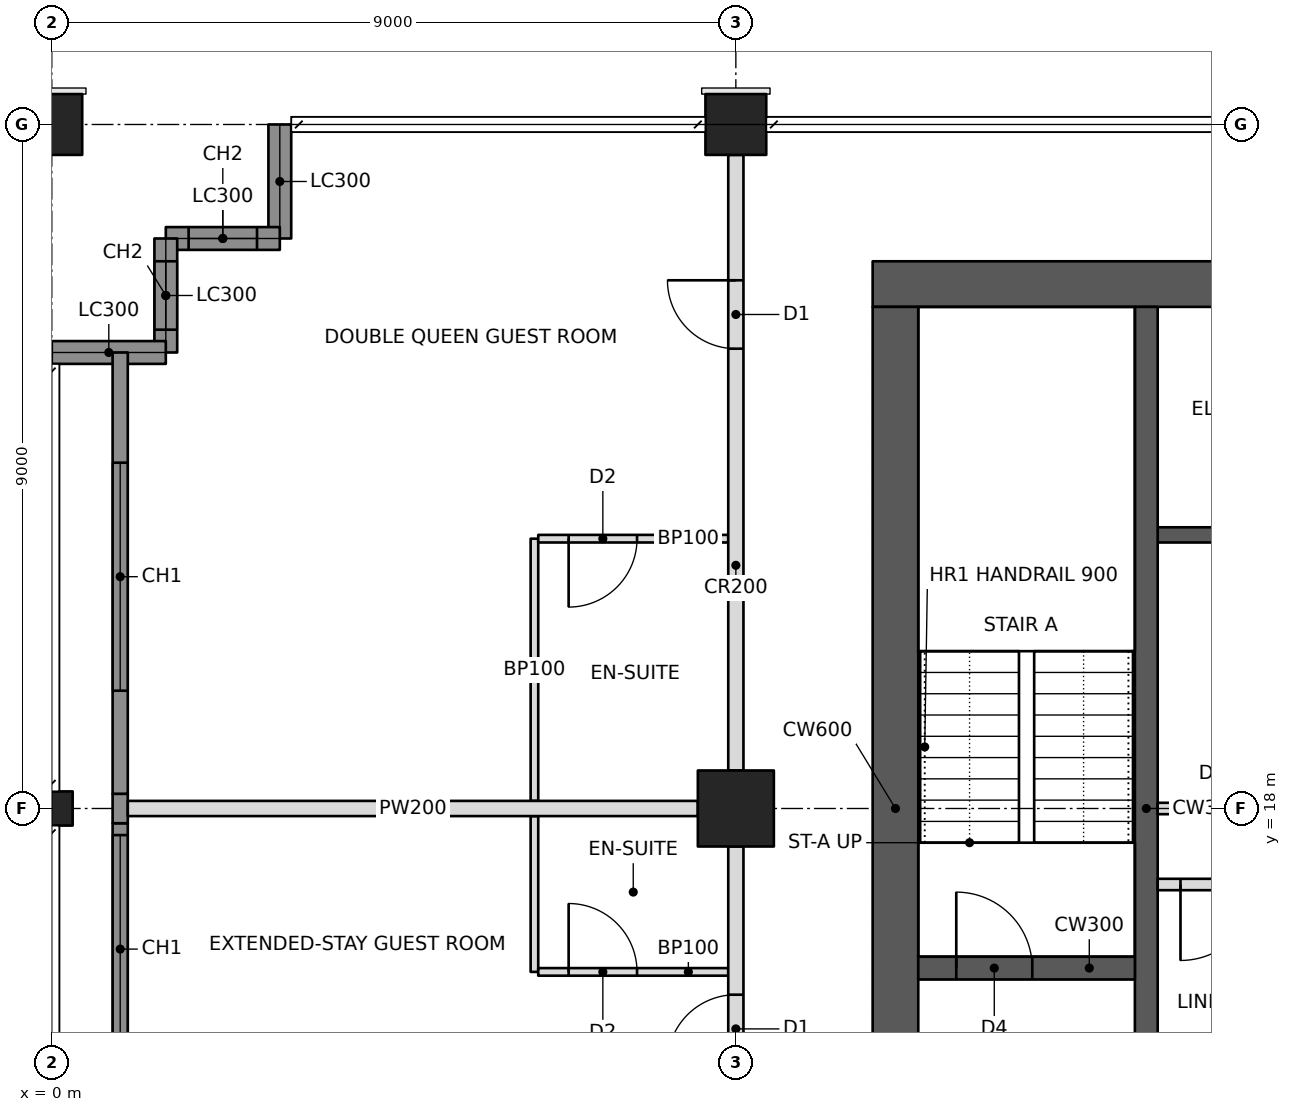
"""IFC4 building model, lengths in metres.
Left out: names, types, materials, properties, quantities, classifications, styles, units other than length and angle.
Written with IfcOpenShell. Run it as: python <this file> out.ifc"""

import sys

from ifc_helpers import new_model, si_unit, direction, frame, frame_2d, origin, origin_2d, place, context, subcontext, project, spatial, rectangle, hollow_rectangle, i_section, extrude, element, fill, save


model = new_model("IFC4")
c1 = context("Model", 3, precision=1e-05, world=origin(), true_north=direction((0.0, 1.0)))
c2 = subcontext(c1, "Body", "Model", "MODEL_VIEW")
j1 = project(units=[si_unit("LENGTHUNIT", "METRE"), si_unit("PLANEANGLEUNIT", "RADIAN")], contexts=[c1])
p1 = place(None, origin())
s1 = spatial("IfcSite", under=j1, at=p1, CompositionType="ELEMENT")
p2 = place(p1, origin())
s2 = spatial("IfcBuilding", under=s1, at=p2, CompositionType="ELEMENT")
p3 = place(p2, frame((0.0, 0.0, 163.8)))
s3 = spatial("IfcBuildingStorey", under=s2, at=p3, CompositionType="ELEMENT", Elevation=163.8)
p4 = place(p3, frame((0.0, 18.0, 0.0), z_axis=(0.0, 0.0, 1.0), x_axis=(0.0, 1.0, 0.0)))
e1 = element("IfcColumn", 1, at=p4, inside=s3, PredefinedType="COLUMN", context=c2, shape_type="SweptSolid", body=[
    extrude(i_section(OverallWidth=0.449, OverallDepth=0.549, WebThickness=0.072, FlangeThickness=0.115, at=origin_2d()), origin(), (0.0, 0.0, 1.0), 3.4),
])
p5 = place(p3, frame((0.0, 27.0, 0.0), z_axis=(0.0, 0.0, 1.0), x_axis=(0.0, 1.0, 0.0)))
e2 = element("IfcColumn", 2, at=p5, inside=s3, PredefinedType="COLUMN", context=c2, shape_type="SweptSolid", body=[
    extrude(hollow_rectangle(XDim=0.8, YDim=0.8, WallThickness=0.07, at=origin_2d()), origin(), (0.0, 0.0, 1.0), 3.4),
])
p6 = place(p3, frame((9.0, 18.0, 0.0), z_axis=(0.0, 0.0, 1.0), x_axis=(1.0, 0.0, 0.0)))
e3 = element("IfcColumn", 3, at=p6, inside=s3, PredefinedType="COLUMN", context=c2, shape_type="SweptSolid", body=[
    extrude(hollow_rectangle(XDim=1.0, YDim=1.0, WallThickness=0.1, at=origin_2d()), origin(), (0.0, 0.0, 1.0), 3.4),
])
p7 = place(p3, frame((9.0, 27.0, 0.0), z_axis=(0.0, 0.0, 1.0), x_axis=(1.0, 0.0, 0.0)))
e4 = element("IfcColumn", 4, at=p7, inside=s3, PredefinedType="COLUMN", context=c2, shape_type="SweptSolid", body=[
    extrude(hollow_rectangle(XDim=0.8, YDim=0.8, WallThickness=0.07, at=origin_2d()), origin(), (0.0, 0.0, 1.0), 3.4),
])
p8 = place(p3, frame((10.8, 24.9, 0.0), z_axis=(0.0, 0.0, 1.0), x_axis=(1.0, 0.0, 0.0)))
e5 = element("IfcWall", 5, at=p8, inside=s3, PredefinedType="SHEAR", context=c2, shape_type="SweptSolid", body=[
    extrude(rectangle(XDim=23.4, YDim=0.6, at=frame_2d((11.7, 0.0))), origin(), (0.0, 0.0, 1.0), 3.4),
])
p9 = place(p8, frame((17.2, 0.0, 0.0)))
e6 = element("IfcOpeningElement", 6, at=p9, cuts=e5, PredefinedType="OPENING", context=c2, shape_type="SweptSolid", body=[
    extrude(rectangle(XDim=1.8, YDim=2.1, at=frame_2d((0.9, 1.05))), frame((0.0, 0.31, 0.0), z_axis=(0.0, -1.0, 0.0), x_axis=(1.0, 0.0, 0.0)), (0.0, 0.0, 1.0), 0.62),
])
p10 = place(p8, frame((21.1, 0.0, 0.0)))
e7 = element("IfcOpeningElement", 7, at=p10, cuts=e5, PredefinedType="OPENING", context=c2, shape_type="SweptSolid", body=[
    extrude(rectangle(XDim=1.0, YDim=2.1, at=frame_2d((0.5, 1.05))), frame((0.0, 0.31, 0.0), z_axis=(0.0, -1.0, 0.0), x_axis=(1.0, 0.0, 0.0)), (0.0, 0.0, 1.0), 0.62),
])
p11 = place(p8, frame((4.9, 0.0, 0.0)))
e8 = element("IfcOpeningElement", 8, at=p11, cuts=e5, PredefinedType="OPENING", context=c2, shape_type="SweptSolid", body=[
    extrude(rectangle(XDim=1.0, YDim=2.1, at=frame_2d((0.5, 1.05))), frame((0.0, 0.31, 0.0), z_axis=(0.0, -1.0, 0.0), x_axis=(1.0, 0.0, 0.0)), (0.0, 0.0, 1.0), 0.62),
])
p12 = place(p3, frame((11.1, 11.4, 0.0), z_axis=(0.0, 0.0, 1.0), x_axis=(0.0, 1.0, 0.0)))
e9 = element("IfcWall", 9, at=p12, inside=s3, PredefinedType="SHEAR", context=c2, shape_type="SweptSolid", body=[
    extrude(rectangle(XDim=13.2, YDim=0.6, at=frame_2d((6.6, 0.0))), origin(), (0.0, 0.0, 1.0), 3.4),
])
p13 = place(p3, frame((14.4, 11.4, 0.0), z_axis=(0.0, 0.0, 1.0), x_axis=(0.0, 1.0, 0.0)))
e10 = element("IfcWall", 10, at=p13, inside=s3, PredefinedType="SHEAR", context=c2, shape_type="SweptSolid", body=[
    extrude(rectangle(XDim=13.2, YDim=0.3, at=frame_2d((6.6, 0.0))), origin(), (0.0, 0.0, 1.0), 3.4),
])
p14 = place(p3, frame((11.4, 15.9, 0.0), z_axis=(0.0, 0.0, 1.0), x_axis=(1.0, 0.0, 0.0)))
e11 = element("IfcWall", 11, at=p14, inside=s3, PredefinedType="SHEAR", context=c2, shape_type="SweptSolid", body=[
    extrude(rectangle(XDim=2.85, YDim=0.3, at=frame_2d((1.425, 0.0))), origin(), (0.0, 0.0, 1.0), 3.4),
])
p15 = place(p14, frame((0.5, 0.0, 0.0)))
e12 = element("IfcOpeningElement", 12, at=p15, cuts=e11, PredefinedType="OPENING", context=c2, shape_type="SweptSolid", body=[
    extrude(rectangle(XDim=1.0, YDim=2.1, at=frame_2d((0.5, 1.05))), frame((0.0, 0.16, 0.0), z_axis=(0.0, -1.0, 0.0), x_axis=(1.0, 0.0, 0.0)), (0.0, 0.0, 1.0), 0.32),
])
p16 = place(p3, frame((14.55, 18.0, 0.0), z_axis=(0.0, 0.0, 1.0), x_axis=(1.0, 0.0, 0.0)))
e13 = element("IfcWall", 13, at=p16, inside=s3, PredefinedType="PARTITIONING", context=c2, shape_type="SweptSolid", body=[
    extrude(rectangle(XDim=3.3, YDim=0.15, at=frame_2d((1.65, 0.0))), origin(), (0.0, 0.0, 1.0), 3.2),
])
p17 = place(p3, frame((14.55, 21.6, 0.0), z_axis=(0.0, 0.0, 1.0), x_axis=(1.0, 0.0, 0.0)))
e14 = element("IfcWall", 14, at=p17, inside=s3, PredefinedType="SHEAR", context=c2, shape_type="SweptSolid", body=[
    extrude(rectangle(XDim=3.3, YDim=0.2, at=frame_2d((1.65, 0.0))), origin(), (0.0, 0.0, 1.0), 3.4),
])
p18 = place(p3, frame((3.0, 27.0, 0.0), z_axis=(0.0, 0.0, 1.0), x_axis=(0.0, -1.0, 0.0)))
e15 = element("IfcWall", 15, at=p18, inside=s3, PredefinedType="SOLIDWALL", context=c2, shape_type="SweptSolid", body=[
    extrude(rectangle(XDim=1.5, YDim=0.3, at=frame_2d((0.75, 0.0))), origin(), (0.0, 0.0, 1.0), 2.42),
])
p19 = place(p3, frame((3.0, 25.5, 0.0), z_axis=(0.0, 0.0, 1.0), x_axis=(-1.0, 0.0, 0.0)))
e16 = element("IfcWall", 16, at=p19, inside=s3, PredefinedType="SOLIDWALL", context=c2, shape_type="SweptSolid", body=[
    extrude(rectangle(XDim=1.5, YDim=0.3, at=frame_2d((0.75, 0.0))), origin(), (0.0, 0.0, 1.0), 3.2),
])
p20 = place(p19, frame((0.3, 0.0, 0.6)))
e17 = element("IfcOpeningElement", 17, at=p20, cuts=e16, PredefinedType="OPENING", context=c2, shape_type="SweptSolid", body=[
    extrude(rectangle(XDim=0.9, YDim=2.2, at=frame_2d((0.45, 1.1))), frame((0.0, 0.16, 0.0), z_axis=(0.0, -1.0, 0.0), x_axis=(1.0, 0.0, 0.0)), (0.0, 0.0, 1.0), 0.32),
])
p21 = place(p3, frame((1.5, 25.5, 0.0), z_axis=(0.0, 0.0, 1.0), x_axis=(0.0, -1.0, 0.0)))
e18 = element("IfcWall", 18, at=p21, inside=s3, PredefinedType="SOLIDWALL", context=c2, shape_type="SweptSolid", body=[
    extrude(rectangle(XDim=1.5, YDim=0.3, at=frame_2d((0.75, 0.0))), origin(), (0.0, 0.0, 1.0), 3.2),
])
p22 = place(p21, frame((0.3, 0.0, 0.6)))
e19 = element("IfcOpeningElement", 19, at=p22, cuts=e18, PredefinedType="OPENING", context=c2, shape_type="SweptSolid", body=[
    extrude(rectangle(XDim=0.9, YDim=2.2, at=frame_2d((0.45, 1.1))), frame((0.0, 0.16, 0.0), z_axis=(0.0, -1.0, 0.0), x_axis=(1.0, 0.0, 0.0)), (0.0, 0.0, 1.0), 0.32),
])
p23 = place(p3, frame((1.5, 24.0, 0.0), z_axis=(0.0, 0.0, 1.0), x_axis=(-1.0, 0.0, 0.0)))
e20 = element("IfcWall", 20, at=p23, inside=s3, PredefinedType="SOLIDWALL", context=c2, shape_type="SweptSolid", body=[
    extrude(rectangle(XDim=1.5, YDim=0.3, at=frame_2d((0.75, 0.0))), origin(), (0.0, 0.0, 1.0), 2.42),
])
p24 = place(p3, frame((9.0, 10.8, 0.0), z_axis=(0.0, 0.0, 1.0), x_axis=(0.0, 1.0, 0.0)))
e21 = element("IfcWall", 21, at=p24, inside=s3, PredefinedType="PARTITIONING", context=c2, shape_type="SweptSolid", body=[
    extrude(rectangle(XDim=6.7, YDim=0.2, at=frame_2d((3.35, 0.0))), origin(), (0.0, 0.0, 1.0), 2.405),
])
p25 = place(p24, frame((0.25, 0.0, 0.0)))
e22 = element("IfcOpeningElement", 22, at=p25, cuts=e21, PredefinedType="OPENING", context=c2, shape_type="SweptSolid", body=[
    extrude(rectangle(XDim=0.9, YDim=2.1, at=frame_2d((0.45, 1.05))), frame((0.0, 0.11, 0.0), z_axis=(0.0, -1.0, 0.0), x_axis=(1.0, 0.0, 0.0)), (0.0, 0.0, 1.0), 0.22),
])
p26 = place(p24, frame((3.85, 0.0, 0.0)))
e23 = element("IfcOpeningElement", 23, at=p26, cuts=e21, PredefinedType="OPENING", context=c2, shape_type="SweptSolid", body=[
    extrude(rectangle(XDim=0.9, YDim=2.1, at=frame_2d((0.45, 1.05))), frame((0.0, 0.11, 0.0), z_axis=(0.0, -1.0, 0.0), x_axis=(1.0, 0.0, 0.0)), (0.0, 0.0, 1.0), 0.22),
])
p27 = place(p3, frame((9.0, 18.5, 0.0), z_axis=(0.0, 0.0, 1.0), x_axis=(0.0, 1.0, 0.0)))
e24 = element("IfcWall", 24, at=p27, inside=s3, PredefinedType="PARTITIONING", context=c2, shape_type="SweptSolid", body=[
    extrude(rectangle(XDim=8.1, YDim=0.2, at=frame_2d((4.05, 0.0))), origin(), (0.0, 0.0, 1.0), 2.405),
])
p28 = place(p27, frame((5.55, 0.0, 0.0)))
e25 = element("IfcOpeningElement", 25, at=p28, cuts=e24, PredefinedType="OPENING", context=c2, shape_type="SweptSolid", body=[
    extrude(rectangle(XDim=0.9, YDim=2.1, at=frame_2d((0.45, 1.05))), frame((0.0, 0.11, 0.0), z_axis=(0.0, -1.0, 0.0), x_axis=(1.0, 0.0, 0.0)), (0.0, 0.0, 1.0), 0.22),
])
p29 = place(p3, frame((8.5, 18.0, 0.0), z_axis=(0.0, 0.0, 1.0), x_axis=(-1.0, 0.0, 0.0)))
e26 = element("IfcWall", 26, at=p29, inside=s3, PredefinedType="PARTITIONING", context=c2, shape_type="SweptSolid", body=[
    extrude(rectangle(XDim=7.5, YDim=0.2, at=frame_2d((3.75, 0.0))), origin(), (0.0, 0.0, 1.0), 2.405),
])
p30 = place(p3, frame((6.35, 15.85, 0.0), z_axis=(0.0, 0.0, 1.0), x_axis=(0.0, 1.0, 0.0)))
e27 = element("IfcWall", 27, at=p30, inside=s3, PredefinedType="PARTITIONING", context=c2, shape_type="SweptSolid", body=[
    extrude(rectangle(XDim=2.05, YDim=0.1, at=frame_2d((1.025, 0.0))), origin(), (0.0, 0.0, 1.0), 2.404),
])
p31 = place(p3, frame((8.9, 15.85, 0.0), z_axis=(0.0, 0.0, 1.0), x_axis=(-1.0, 0.0, 0.0)))
e28 = element("IfcWall", 28, at=p31, inside=s3, PredefinedType="PARTITIONING", context=c2, shape_type="SweptSolid", body=[
    extrude(rectangle(XDim=2.5, YDim=0.1, at=frame_2d((1.25, 0.0))), origin(), (0.0, 0.0, 1.0), 2.404),
])
p32 = place(p31, frame((1.2, 0.0, 0.0)))
e29 = element("IfcOpeningElement", 29, at=p32, cuts=e28, PredefinedType="OPENING", context=c2, shape_type="SweptSolid", body=[
    extrude(rectangle(XDim=0.9, YDim=2.1, at=frame_2d((0.45, 1.05))), frame((0.0, 0.06, 0.0), z_axis=(0.0, -1.0, 0.0), x_axis=(1.0, 0.0, 0.0)), (0.0, 0.0, 1.0), 0.12),
])
p33 = place(p3, frame((6.35, 18.1, 0.0), z_axis=(0.0, 0.0, 1.0), x_axis=(0.0, 1.0, 0.0)))
e30 = element("IfcWall", 30, at=p33, inside=s3, PredefinedType="PARTITIONING", context=c2, shape_type="SweptSolid", body=[
    extrude(rectangle(XDim=3.45, YDim=0.1, at=frame_2d((1.725, 0.0))), origin(), (0.0, 0.0, 1.0), 2.404),
])
p34 = place(p3, frame((8.9, 21.55, 0.0), z_axis=(0.0, 0.0, 1.0), x_axis=(-1.0, 0.0, 0.0)))
e31 = element("IfcWall", 31, at=p34, inside=s3, PredefinedType="PARTITIONING", context=c2, shape_type="SweptSolid", body=[
    extrude(rectangle(XDim=2.5, YDim=0.1, at=frame_2d((1.25, 0.0))), origin(), (0.0, 0.0, 1.0), 2.404),
])
p35 = place(p34, frame((1.2, 0.0, 0.0)))
e32 = element("IfcOpeningElement", 32, at=p35, cuts=e31, PredefinedType="OPENING", context=c2, shape_type="SweptSolid", body=[
    extrude(rectangle(XDim=0.9, YDim=2.1, at=frame_2d((0.45, 1.05))), frame((0.0, 0.06, 0.0), z_axis=(0.0, -1.0, 0.0), x_axis=(1.0, 0.0, 0.0)), (0.0, 0.0, 1.0), 0.12),
])
p36 = place(p3, frame((14.55, 17.0, 0.0), z_axis=(0.0, 0.0, 1.0), x_axis=(1.0, 0.0, 0.0)))
e33 = element("IfcWall", 33, at=p36, inside=s3, PredefinedType="PARTITIONING", context=c2, shape_type="SweptSolid", body=[
    extrude(rectangle(XDim=3.3, YDim=0.15, at=frame_2d((1.65, 0.0))), origin(), (0.0, 0.0, 1.0), 3.2),
])
p37 = place(p36, frame((0.3, 0.0, 0.0)))
e34 = element("IfcOpeningElement", 34, at=p37, cuts=e33, PredefinedType="OPENING", context=c2, shape_type="SweptSolid", body=[
    extrude(rectangle(XDim=1.0, YDim=2.1, at=frame_2d((0.5, 1.05))), frame((0.0, 0.085, 0.0), z_axis=(0.0, -1.0, 0.0), x_axis=(1.0, 0.0, 0.0)), (0.0, 0.0, 1.0), 0.17),
])
p38 = place(p3, frame((0.9, 9.135, 0.0), z_axis=(0.0, 0.0, 1.0), x_axis=(0.0, 1.0, 0.0)))
e35 = element("IfcWall", 35, at=p38, inside=s3, PredefinedType="SOLIDWALL", context=c2, shape_type="SweptSolid", body=[
    extrude(rectangle(XDim=8.671, YDim=0.2, at=frame_2d((4.335, 0.0))), origin(), (0.0, 0.0, 1.0), 3.2),
])
p39 = place(p38, frame((2.015, 0.0, 0.6)))
e36 = element("IfcOpeningElement", 36, at=p39, cuts=e35, PredefinedType="OPENING", context=c2, shape_type="SweptSolid", body=[
    extrude(rectangle(XDim=3.0, YDim=2.2, at=frame_2d((1.5, 1.1))), frame((0.0, 0.11, 0.0), z_axis=(0.0, -1.0, 0.0), x_axis=(1.0, 0.0, 0.0)), (0.0, 0.0, 1.0), 0.22),
])
p40 = place(p38, frame((5.515, 0.0, 0.6)))
e37 = element("IfcOpeningElement", 37, at=p40, cuts=e35, PredefinedType="OPENING", context=c2, shape_type="SweptSolid", body=[
    extrude(rectangle(XDim=3.0, YDim=2.2, at=frame_2d((1.5, 1.1))), frame((0.0, 0.11, 0.0), z_axis=(0.0, -1.0, 0.0), x_axis=(1.0, 0.0, 0.0)), (0.0, 0.0, 1.0), 0.22),
])
p41 = place(p3, frame((0.9, 17.806, 0.0), z_axis=(0.0, 0.0, 1.0), x_axis=(0.0, 1.0, 0.0)))
e38 = element("IfcWall", 38, at=p41, inside=s3, PredefinedType="SOLIDWALL", context=c2, shape_type="SweptSolid", body=[
    extrude(rectangle(XDim=0.388, YDim=0.2, at=frame_2d((0.194, 0.0))), origin(), (0.0, 0.0, 1.0), 2.404),
])
p42 = place(p3, frame((0.9, 18.194, 0.0), z_axis=(0.0, 0.0, 1.0), x_axis=(0.0, 1.0, 0.0)))
e39 = element("IfcWall", 39, at=p42, inside=s3, PredefinedType="SOLIDWALL", context=c2, shape_type="SweptSolid", body=[
    extrude(rectangle(XDim=5.806, YDim=0.2, at=frame_2d((2.903, 0.0))), origin(), (0.0, 0.0, 1.0), 3.2),
])
p43 = place(p42, frame((1.356, 0.0, 0.6)))
e40 = element("IfcOpeningElement", 40, at=p43, cuts=e39, PredefinedType="OPENING", context=c2, shape_type="SweptSolid", body=[
    extrude(rectangle(XDim=3.0, YDim=2.2, at=frame_2d((1.5, 1.1))), frame((0.0, 0.11, 0.0), z_axis=(0.0, -1.0, 0.0), x_axis=(1.0, 0.0, 0.0)), (0.0, 0.0, 1.0), 0.22),
])
p44 = place(p20, origin())
e41 = element("IfcWindow", 41, at=p44, inside=s3, PartitioningType="SINGLE_PANEL", PredefinedType="WINDOW", context=c2, shape_type="SweptSolid", body=[
    extrude(rectangle(XDim=0.9, YDim=2.2, at=frame_2d((0.45, 1.1))), frame((0.0, 0.03, 0.0), z_axis=(0.0, -1.0, 0.0), x_axis=(1.0, 0.0, 0.0)), (0.0, 0.0, 1.0), 0.06),
])
fill(e17, e41)
p45 = place(p22, origin())
e42 = element("IfcWindow", 42, at=p45, inside=s3, PartitioningType="SINGLE_PANEL", PredefinedType="WINDOW", context=c2, shape_type="SweptSolid", body=[
    extrude(rectangle(XDim=0.9, YDim=2.2, at=frame_2d((0.45, 1.1))), frame((0.0, 0.03, 0.0), z_axis=(0.0, -1.0, 0.0), x_axis=(1.0, 0.0, 0.0)), (0.0, 0.0, 1.0), 0.06),
])
fill(e19, e42)
p46 = place(p40, origin())
e43 = element("IfcWindow", 43, at=p46, inside=s3, PartitioningType="TRIPLE_PANEL_VERTICAL", PredefinedType="WINDOW", context=c2, shape_type="SweptSolid", body=[
    extrude(rectangle(XDim=3.0, YDim=2.2, at=frame_2d((1.5, 1.1))), frame((0.0, 0.03, 0.0), z_axis=(0.0, -1.0, 0.0), x_axis=(1.0, 0.0, 0.0)), (0.0, 0.0, 1.0), 0.06),
])
fill(e37, e43)
p47 = place(p43, origin())
e44 = element("IfcWindow", 44, at=p47, inside=s3, PartitioningType="TRIPLE_PANEL_VERTICAL", PredefinedType="WINDOW", context=c2, shape_type="SweptSolid", body=[
    extrude(rectangle(XDim=3.0, YDim=2.2, at=frame_2d((1.5, 1.1))), frame((0.0, 0.03, 0.0), z_axis=(0.0, -1.0, 0.0), x_axis=(1.0, 0.0, 0.0)), (0.0, 0.0, 1.0), 0.06),
])
fill(e40, e44)
p48 = place(p32, frame((0.9, 0.0, 0.0), z_axis=(0.0, 0.0, 1.0), x_axis=(-1.0, 0.0, 0.0)))
e45 = element("IfcDoor", 45, at=p48, inside=s3, OperationType="SINGLE_SWING_LEFT", PredefinedType="DOOR", context=c2, shape_type="SweptSolid", body=[
    extrude(rectangle(XDim=0.9, YDim=2.1, at=frame_2d((0.45, 1.05))), frame((0.0, 0.025, 0.0), z_axis=(0.0, -1.0, 0.0), x_axis=(1.0, 0.0, 0.0)), (0.0, 0.0, 1.0), 0.05),
])
fill(e29, e45)
p49 = place(p26, origin())
e46 = element("IfcDoor", 46, at=p49, inside=s3, OperationType="SINGLE_SWING_LEFT", PredefinedType="DOOR", context=c2, shape_type="SweptSolid", body=[
    extrude(rectangle(XDim=0.9, YDim=2.1, at=frame_2d((0.45, 1.05))), frame((0.0, 0.025, 0.0), z_axis=(0.0, -1.0, 0.0), x_axis=(1.0, 0.0, 0.0)), (0.0, 0.0, 1.0), 0.05),
])
fill(e23, e46)
p50 = place(p35, origin())
e47 = element("IfcDoor", 47, at=p50, inside=s3, OperationType="SINGLE_SWING_RIGHT", PredefinedType="DOOR", context=c2, shape_type="SweptSolid", body=[
    extrude(rectangle(XDim=0.9, YDim=2.1, at=frame_2d((0.45, 1.05))), frame((0.0, 0.025, 0.0), z_axis=(0.0, -1.0, 0.0), x_axis=(1.0, 0.0, 0.0)), (0.0, 0.0, 1.0), 0.05),
])
fill(e32, e47)
p51 = place(p28, origin())
e48 = element("IfcDoor", 48, at=p51, inside=s3, OperationType="SINGLE_SWING_RIGHT", PredefinedType="DOOR", context=c2, shape_type="SweptSolid", body=[
    extrude(rectangle(XDim=0.9, YDim=2.1, at=frame_2d((0.45, 1.05))), frame((0.0, 0.025, 0.0), z_axis=(0.0, -1.0, 0.0), x_axis=(1.0, 0.0, 0.0)), (0.0, 0.0, 1.0), 0.05),
])
fill(e25, e48)
p52 = place(p37, frame((1.0, 0.0, 0.0), z_axis=(0.0, 0.0, 1.0), x_axis=(-1.0, 0.0, 0.0)))
e49 = element("IfcDoor", 49, at=p52, inside=s3, OperationType="SINGLE_SWING_RIGHT", PredefinedType="DOOR", context=c2, shape_type="SweptSolid", body=[
    extrude(rectangle(XDim=1.0, YDim=2.1, at=frame_2d((0.5, 1.05))), frame((0.0, 0.025, 0.0), z_axis=(0.0, -1.0, 0.0), x_axis=(1.0, 0.0, 0.0)), (0.0, 0.0, 1.0), 0.05),
])
fill(e34, e49)
p53 = place(p15, origin())
e50 = element("IfcDoor", 50, at=p53, inside=s3, OperationType="SINGLE_SWING_LEFT", PredefinedType="DOOR", context=c2, shape_type="SweptSolid", body=[
    extrude(rectangle(XDim=1.0, YDim=2.1, at=frame_2d((0.5, 1.05))), frame((0.0, 0.025, 0.0), z_axis=(0.0, -1.0, 0.0), x_axis=(1.0, 0.0, 0.0)), (0.0, 0.0, 1.0), 0.05),
])
fill(e12, e50)
save(model, sys.argv[1])
